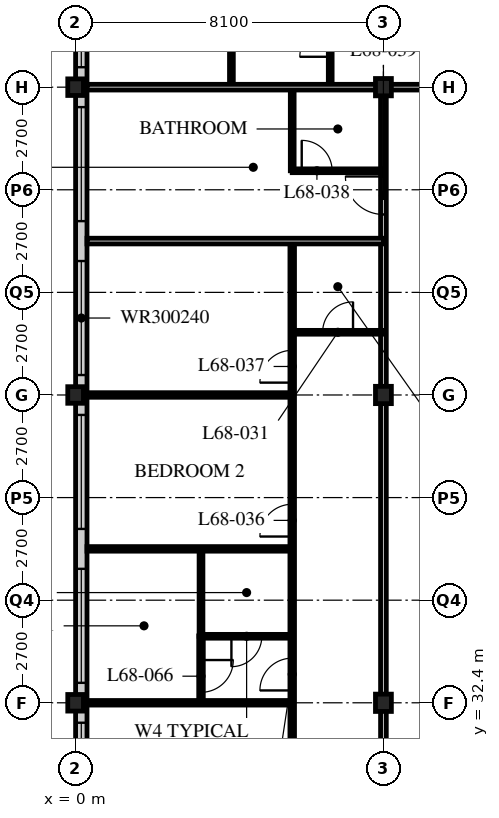
"""IFC4 building model, lengths in metres.
Left out: names, types, materials, properties, quantities, classifications, styles, units other than length and angle.
Written with IfcOpenShell. Run it as: python <this file> out.ifc"""

import sys

from ifc_helpers import new_model, si_unit, direction, frame, frame_2d, origin, origin_2d, place, context, subcontext, project, spatial, rectangle, i_section, extrude, element, fill, save


model = new_model("IFC4")
c1 = context("Model", 3, precision=1e-05, world=origin(), true_north=direction((0.0, 1.0)))
c2 = subcontext(c1, "Body", "Model", "MODEL_VIEW")
j1 = project(units=[si_unit("LENGTHUNIT", "METRE"), si_unit("PLANEANGLEUNIT", "RADIAN")], contexts=[c1])
p1 = place(None, origin())
s1 = spatial("IfcSite", under=j1, at=p1, CompositionType="ELEMENT")
p2 = place(p1, origin())
s2 = spatial("IfcBuilding", under=s1, at=p2, CompositionType="ELEMENT")
p3 = place(p2, frame((0.0, 0.0, 265.8)))
s3 = spatial("IfcBuildingStorey", under=s2, at=p3, CompositionType="ELEMENT", Elevation=265.8)
for number, where, z_axis, x_axis in (
    (1, (0.0, 32.4, 0.0), (0.0, 0.0, 1.0), (1.0, 0.0, 0.0)),
    (2, (0.0, 40.5, 0.0), (0.0, 0.0, 1.0), (1.0, 0.0, 0.0)),
    (3, (0.0, 48.6, 0.0), (0.0, 0.0, 1.0), (1.0, 0.0, 0.0)),
):
    element("IfcColumn", number, at=place(p3, frame(where, z_axis=z_axis, x_axis=x_axis)), inside=s3, PredefinedType="COLUMN", context=c2, shape_type="SweptSolid", body=[
        extrude(i_section(OverallWidth=0.412, OverallDepth=0.437, WebThickness=0.036, FlangeThickness=0.058, FilletRadius=0.015, at=origin_2d()), origin(), (0.0, 0.0, 1.0), 3.9),
    ])
for number, where, z_axis, x_axis in (
    (4, (8.1, 32.4, 0.0), (0.0, 0.0, 1.0), (1.0, 0.0, 0.0)),
    (5, (8.1, 40.5, 0.0), (0.0, 0.0, 1.0), (1.0, 0.0, 0.0)),
    (6, (8.1, 48.6, 0.0), (0.0, 0.0, 1.0), (1.0, 0.0, 0.0)),
):
    element("IfcColumn", number, at=place(p3, frame(where, z_axis=z_axis, x_axis=x_axis)), inside=s3, PredefinedType="COLUMN", context=c2, shape_type="SweptSolid", body=[
        extrude(i_section(OverallWidth=0.418, OverallDepth=0.456, WebThickness=0.042, FlangeThickness=0.067, FilletRadius=0.015, at=origin_2d()), origin(), (0.0, 0.0, 1.0), 3.9),
    ])
p4 = place(p3, frame((0.15, 56.4, 0.0), z_axis=(0.0, 0.0, 1.0), x_axis=(0.0, -1.0, 0.0)))
e7 = element("IfcWall", 7, at=p4, inside=s3, PredefinedType="SOLIDWALL", context=c2, shape_type="SweptSolid", body=[
    extrude(rectangle(XDim=32.1, YDim=0.3, at=frame_2d((16.05, 0.0))), origin(), (0.0, 0.0, 1.0), 3.69),
])
p5 = place(p4, frame((0.225, 0.0, 0.6)))
e8 = element("IfcOpeningElement", 8, at=p5, cuts=e7, PredefinedType="OPENING", context=c2, shape_type="SweptSolid", body=[
    extrude(rectangle(XDim=3.0, YDim=2.4, at=frame_2d((1.5, 1.2))), frame((0.0, 0.16, 0.0), z_axis=(0.0, -1.0, 0.0), x_axis=(1.0, 0.0, 0.0)), (0.0, 0.0, 1.0), 0.32),
])
p6 = place(p4, frame((4.275, 0.0, 0.6)))
e9 = element("IfcOpeningElement", 9, at=p6, cuts=e7, PredefinedType="OPENING", context=c2, shape_type="SweptSolid", body=[
    extrude(rectangle(XDim=3.0, YDim=2.4, at=frame_2d((1.5, 1.2))), frame((0.0, 0.16, 0.0), z_axis=(0.0, -1.0, 0.0), x_axis=(1.0, 0.0, 0.0)), (0.0, 0.0, 1.0), 0.32),
])
p7 = place(p4, frame((8.325, 0.0, 0.6)))
e10 = element("IfcOpeningElement", 10, at=p7, cuts=e7, PredefinedType="OPENING", context=c2, shape_type="SweptSolid", body=[
    extrude(rectangle(XDim=3.0, YDim=2.4, at=frame_2d((1.5, 1.2))), frame((0.0, 0.16, 0.0), z_axis=(0.0, -1.0, 0.0), x_axis=(1.0, 0.0, 0.0)), (0.0, 0.0, 1.0), 0.32),
])
p8 = place(p4, frame((12.375, 0.0, 0.6)))
e11 = element("IfcOpeningElement", 11, at=p8, cuts=e7, PredefinedType="OPENING", context=c2, shape_type="SweptSolid", body=[
    extrude(rectangle(XDim=3.0, YDim=2.4, at=frame_2d((1.5, 1.2))), frame((0.0, 0.16, 0.0), z_axis=(0.0, -1.0, 0.0), x_axis=(1.0, 0.0, 0.0)), (0.0, 0.0, 1.0), 0.32),
])
p9 = place(p4, frame((16.425, 0.0, 0.6)))
e12 = element("IfcOpeningElement", 12, at=p9, cuts=e7, PredefinedType="OPENING", context=c2, shape_type="SweptSolid", body=[
    extrude(rectangle(XDim=3.0, YDim=2.4, at=frame_2d((1.5, 1.2))), frame((0.0, 0.16, 0.0), z_axis=(0.0, -1.0, 0.0), x_axis=(1.0, 0.0, 0.0)), (0.0, 0.0, 1.0), 0.32),
])
p10 = place(p4, frame((20.475, 0.0, 0.6)))
e13 = element("IfcOpeningElement", 13, at=p10, cuts=e7, PredefinedType="OPENING", context=c2, shape_type="SweptSolid", body=[
    extrude(rectangle(XDim=3.0, YDim=2.4, at=frame_2d((1.5, 1.2))), frame((0.0, 0.16, 0.0), z_axis=(0.0, -1.0, 0.0), x_axis=(1.0, 0.0, 0.0)), (0.0, 0.0, 1.0), 0.32),
])
p11 = place(p4, frame((24.525, 0.0, 0.6)))
e14 = element("IfcOpeningElement", 14, at=p11, cuts=e7, PredefinedType="OPENING", context=c2, shape_type="SweptSolid", body=[
    extrude(rectangle(XDim=3.0, YDim=2.4, at=frame_2d((1.5, 1.2))), frame((0.0, 0.16, 0.0), z_axis=(0.0, -1.0, 0.0), x_axis=(1.0, 0.0, 0.0)), (0.0, 0.0, 1.0), 0.32),
])
p12 = place(p4, frame((28.575, 0.0, 0.6)))
e15 = element("IfcOpeningElement", 15, at=p12, cuts=e7, PredefinedType="OPENING", context=c2, shape_type="SweptSolid", body=[
    extrude(rectangle(XDim=3.0, YDim=2.4, at=frame_2d((1.5, 1.2))), frame((0.0, 0.16, 0.0), z_axis=(0.0, -1.0, 0.0), x_axis=(1.0, 0.0, 0.0)), (0.0, 0.0, 1.0), 0.32),
])
p13 = place(p3, frame((8.1, 48.6, 0.0), z_axis=(0.0, 0.0, 1.0), x_axis=(1.0, 0.0, 0.0)))
e16 = element("IfcWall", 16, at=p13, inside=s3, PredefinedType="PARTITIONING", context=c2, shape_type="SweptSolid", body=[
    extrude(rectangle(XDim=28.35, YDim=0.15, at=frame_2d((14.175, 0.0))), origin(), (0.0, 0.0, 1.0), 3.078),
])
p14 = place(p13, frame((4.45, 0.0, 0.0)))
e17 = element("IfcOpeningElement", 17, at=p14, cuts=e16, PredefinedType="OPENING", context=c2, shape_type="SweptSolid", body=[
    extrude(rectangle(XDim=1.0, YDim=2.1, at=frame_2d((0.5, 1.05))), frame((0.0, 0.085, 0.0), z_axis=(0.0, -1.0, 0.0), x_axis=(1.0, 0.0, 0.0)), (0.0, 0.0, 1.0), 0.17),
])
p15 = place(p13, frame((20.65, 0.0, 0.0)))
e18 = element("IfcOpeningElement", 18, at=p15, cuts=e16, PredefinedType="OPENING", context=c2, shape_type="SweptSolid", body=[
    extrude(rectangle(XDim=1.0, YDim=2.1, at=frame_2d((0.5, 1.05))), frame((0.0, 0.085, 0.0), z_axis=(0.0, -1.0, 0.0), x_axis=(1.0, 0.0, 0.0)), (0.0, 0.0, 1.0), 0.17),
])
p16 = place(p13, frame((1.525, 0.0, 0.0)))
e19 = element("IfcOpeningElement", 19, at=p16, cuts=e16, PredefinedType="OPENING", context=c2, shape_type="SweptSolid", body=[
    extrude(rectangle(XDim=1.0, YDim=2.1, at=frame_2d((0.5, 1.05))), frame((0.0, 0.085, 0.0), z_axis=(0.0, -1.0, 0.0), x_axis=(1.0, 0.0, 0.0)), (0.0, 0.0, 1.0), 0.17),
])
p17 = place(p3, frame((8.1, 22.5, 0.0), z_axis=(0.0, 0.0, 1.0), x_axis=(0.0, 1.0, 0.0)))
e20 = element("IfcWall", 20, at=p17, inside=s3, PredefinedType="PARTITIONING", context=c2, shape_type="SweptSolid", body=[
    extrude(rectangle(XDim=26.1, YDim=0.15, at=frame_2d((13.05, 0.0))), origin(), (0.0, 0.0, 1.0), 3.078),
])
p18 = place(p17, frame((2.65, 0.0, 0.0)))
e21 = element("IfcOpeningElement", 21, at=p18, cuts=e20, PredefinedType="OPENING", context=c2, shape_type="SweptSolid", body=[
    extrude(rectangle(XDim=1.0, YDim=2.1, at=frame_2d((0.5, 1.05))), frame((0.0, 0.085, 0.0), z_axis=(0.0, -1.0, 0.0), x_axis=(1.0, 0.0, 0.0)), (0.0, 0.0, 1.0), 0.17),
])
p19 = place(p17, frame((22.75, 0.0, 0.0)))
e22 = element("IfcOpeningElement", 22, at=p19, cuts=e20, PredefinedType="OPENING", context=c2, shape_type="SweptSolid", body=[
    extrude(rectangle(XDim=1.0, YDim=2.1, at=frame_2d((0.5, 1.05))), frame((0.0, 0.085, 0.0), z_axis=(0.0, -1.0, 0.0), x_axis=(1.0, 0.0, 0.0)), (0.0, 0.0, 1.0), 0.17),
])
p20 = place(p3, frame((5.7, 22.5, 0.0), z_axis=(0.0, 0.0, 1.0), x_axis=(0.0, 1.0, 0.0)))
e23 = element("IfcWall", 23, at=p20, inside=s3, PredefinedType="PARTITIONING", context=c2, shape_type="SweptSolid", body=[
    extrude(rectangle(XDim=22.05, YDim=0.12, at=frame_2d((11.025, 0.0))), origin(), (0.0, 0.0, 1.0), 3.69),
])
p21 = place(p20, frame((0.975, 0.0, 0.0)))
e24 = element("IfcOpeningElement", 24, at=p21, cuts=e23, PredefinedType="OPENING", context=c2, shape_type="SweptSolid", body=[
    extrude(rectangle(XDim=0.85, YDim=2.1, at=frame_2d((0.425, 1.05))), frame((0.0, 0.07, 0.0), z_axis=(0.0, -1.0, 0.0), x_axis=(1.0, 0.0, 0.0)), (0.0, 0.0, 1.0), 0.14),
])
p22 = place(p20, frame((10.225, 0.0, 0.0)))
e25 = element("IfcOpeningElement", 25, at=p22, cuts=e23, PredefinedType="OPENING", context=c2, shape_type="SweptSolid", body=[
    extrude(rectangle(XDim=0.85, YDim=2.1, at=frame_2d((0.425, 1.05))), frame((0.0, 0.07, 0.0), z_axis=(0.0, -1.0, 0.0), x_axis=(1.0, 0.0, 0.0)), (0.0, 0.0, 1.0), 0.14),
])
p23 = place(p20, frame((14.275, 0.0, 0.0)))
e26 = element("IfcOpeningElement", 26, at=p23, cuts=e23, PredefinedType="OPENING", context=c2, shape_type="SweptSolid", body=[
    extrude(rectangle(XDim=0.85, YDim=2.1, at=frame_2d((0.425, 1.05))), frame((0.0, 0.07, 0.0), z_axis=(0.0, -1.0, 0.0), x_axis=(1.0, 0.0, 0.0)), (0.0, 0.0, 1.0), 0.14),
])
p24 = place(p20, frame((18.325, 0.0, 0.0)))
e27 = element("IfcOpeningElement", 27, at=p24, cuts=e23, PredefinedType="OPENING", context=c2, shape_type="SweptSolid", body=[
    extrude(rectangle(XDim=0.85, YDim=2.1, at=frame_2d((0.425, 1.05))), frame((0.0, 0.07, 0.0), z_axis=(0.0, -1.0, 0.0), x_axis=(1.0, 0.0, 0.0)), (0.0, 0.0, 1.0), 0.14),
])
p25 = place(p3, frame((8.1, 42.15, 0.0), z_axis=(0.0, 0.0, 1.0), x_axis=(-1.0, 0.0, 0.0)))
e28 = element("IfcWall", 28, at=p25, inside=s3, PredefinedType="PARTITIONING", context=c2, shape_type="SweptSolid", body=[
    extrude(rectangle(XDim=2.4, YDim=0.1, at=frame_2d((1.2, 0.0))), origin(), (0.0, 0.0, 1.0), 3.69),
])
p26 = place(p25, frame((0.8, 0.0, 0.0)))
e29 = element("IfcOpeningElement", 29, at=p26, cuts=e28, PredefinedType="OPENING", context=c2, shape_type="SweptSolid", body=[
    extrude(rectangle(XDim=0.8, YDim=2.1, at=frame_2d((0.4, 1.05))), frame((0.0, 0.06, 0.0), z_axis=(0.0, -1.0, 0.0), x_axis=(1.0, 0.0, 0.0)), (0.0, 0.0, 1.0), 0.12),
])
p27 = place(p3, frame((5.7, 34.15, 0.0), z_axis=(0.0, 0.0, 1.0), x_axis=(-1.0, 0.0, 0.0)))
e30 = element("IfcWall", 30, at=p27, inside=s3, PredefinedType="PARTITIONING", context=c2, shape_type="SweptSolid", body=[
    extrude(rectangle(XDim=2.4, YDim=0.1, at=frame_2d((1.2, 0.0))), origin(), (0.0, 0.0, 1.0), 3.69),
])
p28 = place(p27, frame((0.8, 0.0, 0.0)))
e31 = element("IfcOpeningElement", 31, at=p28, cuts=e30, PredefinedType="OPENING", context=c2, shape_type="SweptSolid", body=[
    extrude(rectangle(XDim=0.8, YDim=2.1, at=frame_2d((0.4, 1.05))), frame((0.0, 0.06, 0.0), z_axis=(0.0, -1.0, 0.0), x_axis=(1.0, 0.0, 0.0)), (0.0, 0.0, 1.0), 0.12),
])
p29 = place(p3, frame((3.3, 34.15, 0.0), z_axis=(0.0, 0.0, 1.0), x_axis=(0.0, 1.0, 0.0)))
e32 = element("IfcWall", 32, at=p29, inside=s3, PredefinedType="PARTITIONING", context=c2, shape_type="SweptSolid", body=[
    extrude(rectangle(XDim=2.3, YDim=0.1, at=frame_2d((1.15, 0.0))), origin(), (0.0, 0.0, 1.0), 3.69),
])
p30 = place(p3, frame((5.7, 32.4, 0.0), z_axis=(0.0, 0.0, 1.0), x_axis=(-1.0, 0.0, 0.0)))
e33 = element("IfcWall", 33, at=p30, inside=s3, PredefinedType="PARTITIONING", context=c2, shape_type="SweptSolid", body=[
    extrude(rectangle(XDim=5.4, YDim=0.12, at=frame_2d((2.7, 0.0))), origin(), (0.0, 0.0, 1.0), 3.078),
])
p31 = place(p3, frame((5.7, 36.45, 0.0), z_axis=(0.0, 0.0, 1.0), x_axis=(-1.0, 0.0, 0.0)))
e34 = element("IfcWall", 34, at=p31, inside=s3, PredefinedType="PARTITIONING", context=c2, shape_type="SweptSolid", body=[
    extrude(rectangle(XDim=5.4, YDim=0.12, at=frame_2d((2.7, 0.0))), origin(), (0.0, 0.0, 1.0), 3.69),
])
p32 = place(p3, frame((5.7, 40.5, 0.0), z_axis=(0.0, 0.0, 1.0), x_axis=(-1.0, 0.0, 0.0)))
e35 = element("IfcWall", 35, at=p32, inside=s3, PredefinedType="PARTITIONING", context=c2, shape_type="SweptSolid", body=[
    extrude(rectangle(XDim=5.4, YDim=0.12, at=frame_2d((2.7, 0.0))), origin(), (0.0, 0.0, 1.0), 3.078),
])
p33 = place(p3, frame((8.1, 44.55, 0.0), z_axis=(0.0, 0.0, 1.0), x_axis=(-1.0, 0.0, 0.0)))
e36 = element("IfcWall", 36, at=p33, inside=s3, PredefinedType="PARTITIONING", context=c2, shape_type="SweptSolid", body=[
    extrude(rectangle(XDim=7.8, YDim=0.15, at=frame_2d((3.9, 0.0))), origin(), (0.0, 0.0, 1.0), 3.69),
])
p34 = place(p3, frame((5.7, 46.4, 0.0), z_axis=(0.0, 0.0, 1.0), x_axis=(0.0, 1.0, 0.0)))
e37 = element("IfcWall", 37, at=p34, inside=s3, PredefinedType="PARTITIONING", context=c2, shape_type="SweptSolid", body=[
    extrude(rectangle(XDim=2.2, YDim=0.1, at=frame_2d((1.1, 0.0))), origin(), (0.0, 0.0, 1.0), 3.69),
])
p35 = place(p3, frame((8.1, 46.4, 0.0), z_axis=(0.0, 0.0, 1.0), x_axis=(-1.0, 0.0, 0.0)))
e38 = element("IfcWall", 38, at=p35, inside=s3, PredefinedType="PARTITIONING", context=c2, shape_type="SweptSolid", body=[
    extrude(rectangle(XDim=2.4, YDim=0.1, at=frame_2d((1.2, 0.0))), origin(), (0.0, 0.0, 1.0), 3.69),
])
p36 = place(p35, frame((1.35, 0.0, 0.0)))
e39 = element("IfcOpeningElement", 39, at=p36, cuts=e38, PredefinedType="OPENING", context=c2, shape_type="SweptSolid", body=[
    extrude(rectangle(XDim=0.8, YDim=2.1, at=frame_2d((0.4, 1.05))), frame((0.0, 0.06, 0.0), z_axis=(0.0, -1.0, 0.0), x_axis=(1.0, 0.0, 0.0)), (0.0, 0.0, 1.0), 0.12),
])
p37 = place(p3, frame((6.7, 48.6, 0.0), z_axis=(0.0, 0.0, 1.0), x_axis=(0.0, 1.0, 0.0)))
e40 = element("IfcWall", 40, at=p37, inside=s3, PredefinedType="PARTITIONING", context=c2, shape_type="SweptSolid", body=[
    extrude(rectangle(XDim=2.4, YDim=0.1, at=frame_2d((1.2, 0.0))), origin(), (0.0, 0.0, 1.0), 3.69),
])
p38 = place(p37, frame((0.8, 0.0, 0.0)))
e41 = element("IfcOpeningElement", 41, at=p38, cuts=e40, PredefinedType="OPENING", context=c2, shape_type="SweptSolid", body=[
    extrude(rectangle(XDim=0.8, YDim=2.1, at=frame_2d((0.4, 1.05))), frame((0.0, 0.06, 0.0), z_axis=(0.0, -1.0, 0.0), x_axis=(1.0, 0.0, 0.0)), (0.0, 0.0, 1.0), 0.12),
])
p39 = place(p3, frame((4.1, 48.6, 0.0), z_axis=(0.0, 0.0, 1.0), x_axis=(0.0, 1.0, 0.0)))
e42 = element("IfcWall", 42, at=p39, inside=s3, PredefinedType="PARTITIONING", context=c2, shape_type="SweptSolid", body=[
    extrude(rectangle(XDim=2.4, YDim=0.1, at=frame_2d((1.2, 0.0))), origin(), (0.0, 0.0, 1.0), 3.69),
])
p40 = place(p3, frame((0.3, 48.6, 0.0), z_axis=(0.0, 0.0, 1.0), x_axis=(1.0, 0.0, 0.0)))
e43 = element("IfcWall", 43, at=p40, inside=s3, PredefinedType="PARTITIONING", context=c2, shape_type="SweptSolid", body=[
    extrude(rectangle(XDim=7.8, YDim=0.15, at=frame_2d((3.9, 0.0))), origin(), (0.0, 0.0, 1.0), 3.078),
])
p41 = place(p3, frame((3.3, 32.4, 0.0), z_axis=(0.0, 0.0, 1.0), x_axis=(0.0, 1.0, 0.0)))
e44 = element("IfcWall", 44, at=p41, inside=s3, PredefinedType="PARTITIONING", context=c2, shape_type="SweptSolid", body=[
    extrude(rectangle(XDim=1.76, YDim=0.12, at=frame_2d((0.88, 0.0))), origin(), (0.0, 0.0, 1.0), 3.69),
])
p42 = place(p41, frame((0.275, 0.0, 0.0)))
e45 = element("IfcOpeningElement", 45, at=p42, cuts=e44, PredefinedType="OPENING", context=c2, shape_type="SweptSolid", body=[
    extrude(rectangle(XDim=0.85, YDim=2.1, at=frame_2d((0.425, 1.05))), frame((0.0, 0.07, 0.0), z_axis=(0.0, -1.0, 0.0), x_axis=(1.0, 0.0, 0.0)), (0.0, 0.0, 1.0), 0.14),
])
p43 = place(p6, origin())
e46 = element("IfcWindow", 46, at=p43, inside=s3, PartitioningType="SINGLE_PANEL", PredefinedType="WINDOW", context=c2, shape_type="SweptSolid", body=[
    extrude(rectangle(XDim=3.0, YDim=2.4, at=frame_2d((1.5, 1.2))), frame((0.0, 0.03, 0.0), z_axis=(0.0, -1.0, 0.0), x_axis=(1.0, 0.0, 0.0)), (0.0, 0.0, 1.0), 0.06),
])
fill(e9, e46)
p44 = place(p7, origin())
e47 = element("IfcWindow", 47, at=p44, inside=s3, PartitioningType="SINGLE_PANEL", PredefinedType="WINDOW", context=c2, shape_type="SweptSolid", body=[
    extrude(rectangle(XDim=3.0, YDim=2.4, at=frame_2d((1.5, 1.2))), frame((0.0, 0.03, 0.0), z_axis=(0.0, -1.0, 0.0), x_axis=(1.0, 0.0, 0.0)), (0.0, 0.0, 1.0), 0.06),
])
fill(e10, e47)
p45 = place(p8, origin())
e48 = element("IfcWindow", 48, at=p45, inside=s3, PartitioningType="SINGLE_PANEL", PredefinedType="WINDOW", context=c2, shape_type="SweptSolid", body=[
    extrude(rectangle(XDim=3.0, YDim=2.4, at=frame_2d((1.5, 1.2))), frame((0.0, 0.03, 0.0), z_axis=(0.0, -1.0, 0.0), x_axis=(1.0, 0.0, 0.0)), (0.0, 0.0, 1.0), 0.06),
])
fill(e11, e48)
p46 = place(p9, origin())
e49 = element("IfcWindow", 49, at=p46, inside=s3, PartitioningType="SINGLE_PANEL", PredefinedType="WINDOW", context=c2, shape_type="SweptSolid", body=[
    extrude(rectangle(XDim=3.0, YDim=2.4, at=frame_2d((1.5, 1.2))), frame((0.0, 0.03, 0.0), z_axis=(0.0, -1.0, 0.0), x_axis=(1.0, 0.0, 0.0)), (0.0, 0.0, 1.0), 0.06),
])
fill(e12, e49)
p47 = place(p10, origin())
e50 = element("IfcWindow", 50, at=p47, inside=s3, PartitioningType="SINGLE_PANEL", PredefinedType="WINDOW", context=c2, shape_type="SweptSolid", body=[
    extrude(rectangle(XDim=3.0, YDim=2.4, at=frame_2d((1.5, 1.2))), frame((0.0, 0.03, 0.0), z_axis=(0.0, -1.0, 0.0), x_axis=(1.0, 0.0, 0.0)), (0.0, 0.0, 1.0), 0.06),
])
fill(e13, e50)
p48 = place(p11, origin())
e51 = element("IfcWindow", 51, at=p48, inside=s3, PartitioningType="SINGLE_PANEL", PredefinedType="WINDOW", context=c2, shape_type="SweptSolid", body=[
    extrude(rectangle(XDim=3.0, YDim=2.4, at=frame_2d((1.5, 1.2))), frame((0.0, 0.03, 0.0), z_axis=(0.0, -1.0, 0.0), x_axis=(1.0, 0.0, 0.0)), (0.0, 0.0, 1.0), 0.06),
])
fill(e14, e51)
p49 = place(p26, origin())
e52 = element("IfcDoor", 52, at=p49, inside=s3, OperationType="SINGLE_SWING_RIGHT", PredefinedType="DOOR", context=c2, shape_type="SweptSolid", body=[
    extrude(rectangle(XDim=0.8, YDim=2.1, at=frame_2d((0.4, 1.05))), frame((0.0, 0.025, 0.0), z_axis=(0.0, -1.0, 0.0), x_axis=(1.0, 0.0, 0.0)), (0.0, 0.0, 1.0), 0.05),
])
fill(e29, e52)
p50 = place(p28, origin())
e53 = element("IfcDoor", 53, at=p50, inside=s3, OperationType="SINGLE_SWING_RIGHT", PredefinedType="DOOR", context=c2, shape_type="SweptSolid", body=[
    extrude(rectangle(XDim=0.8, YDim=2.1, at=frame_2d((0.4, 1.05))), frame((0.0, 0.025, 0.0), z_axis=(0.0, -1.0, 0.0), x_axis=(1.0, 0.0, 0.0)), (0.0, 0.0, 1.0), 0.05),
])
fill(e31, e53)
p51 = place(p22, origin())
e54 = element("IfcDoor", 54, at=p51, inside=s3, OperationType="SINGLE_SWING_LEFT", PredefinedType="DOOR", context=c2, shape_type="SweptSolid", body=[
    extrude(rectangle(XDim=0.85, YDim=2.1, at=frame_2d((0.425, 1.05))), frame((0.0, 0.025, 0.0), z_axis=(0.0, -1.0, 0.0), x_axis=(1.0, 0.0, 0.0)), (0.0, 0.0, 1.0), 0.05),
])
fill(e25, e54)
p52 = place(p23, origin())
e55 = element("IfcDoor", 55, at=p52, inside=s3, OperationType="SINGLE_SWING_LEFT", PredefinedType="DOOR", context=c2, shape_type="SweptSolid", body=[
    extrude(rectangle(XDim=0.85, YDim=2.1, at=frame_2d((0.425, 1.05))), frame((0.0, 0.025, 0.0), z_axis=(0.0, -1.0, 0.0), x_axis=(1.0, 0.0, 0.0)), (0.0, 0.0, 1.0), 0.05),
])
fill(e26, e55)
p53 = place(p24, origin())
e56 = element("IfcDoor", 56, at=p53, inside=s3, OperationType="SINGLE_SWING_LEFT", PredefinedType="DOOR", context=c2, shape_type="SweptSolid", body=[
    extrude(rectangle(XDim=0.85, YDim=2.1, at=frame_2d((0.425, 1.05))), frame((0.0, 0.025, 0.0), z_axis=(0.0, -1.0, 0.0), x_axis=(1.0, 0.0, 0.0)), (0.0, 0.0, 1.0), 0.05),
])
fill(e27, e56)
p54 = place(p36, origin())
e57 = element("IfcDoor", 57, at=p54, inside=s3, OperationType="SINGLE_SWING_LEFT", PredefinedType="DOOR", context=c2, shape_type="SweptSolid", body=[
    extrude(rectangle(XDim=0.8, YDim=2.1, at=frame_2d((0.4, 1.05))), frame((0.0, 0.025, 0.0), z_axis=(0.0, -1.0, 0.0), x_axis=(1.0, 0.0, 0.0)), (0.0, 0.0, 1.0), 0.05),
])
fill(e39, e57)
p55 = place(p19, origin())
e58 = element("IfcDoor", 58, at=p55, inside=s3, OperationType="SINGLE_SWING_RIGHT", PredefinedType="DOOR", context=c2, shape_type="SweptSolid", body=[
    extrude(rectangle(XDim=1.0, YDim=2.1, at=frame_2d((0.5, 1.05))), frame((0.0, 0.025, 0.0), z_axis=(0.0, -1.0, 0.0), x_axis=(1.0, 0.0, 0.0)), (0.0, 0.0, 1.0), 0.05),
])
fill(e22, e58)
p56 = place(p38, origin())
e59 = element("IfcDoor", 59, at=p56, inside=s3, OperationType="SINGLE_SWING_LEFT", PredefinedType="DOOR", context=c2, shape_type="SweptSolid", body=[
    extrude(rectangle(XDim=0.8, YDim=2.1, at=frame_2d((0.4, 1.05))), frame((0.0, 0.025, 0.0), z_axis=(0.0, -1.0, 0.0), x_axis=(1.0, 0.0, 0.0)), (0.0, 0.0, 1.0), 0.05),
])
fill(e41, e59)
p57 = place(p42, origin())
e60 = element("IfcDoor", 60, at=p57, inside=s3, OperationType="SINGLE_SWING_LEFT", PredefinedType="DOOR", context=c2, shape_type="SweptSolid", body=[
    extrude(rectangle(XDim=0.85, YDim=2.1, at=frame_2d((0.425, 1.05))), frame((0.0, 0.025, 0.0), z_axis=(0.0, -1.0, 0.0), x_axis=(1.0, 0.0, 0.0)), (0.0, 0.0, 1.0), 0.05),
])
fill(e45, e60)
save(model, sys.argv[1])
